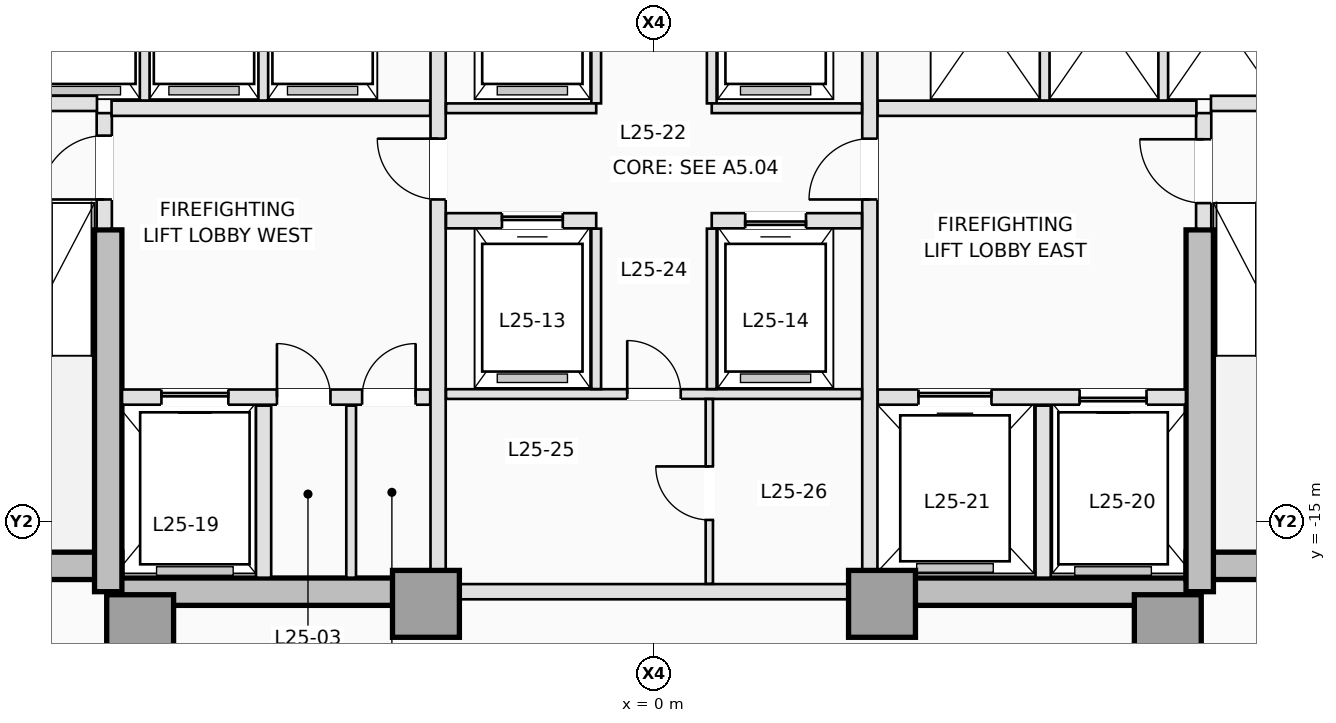
"""IFC4 building model, lengths in metres.
Left out: names, types, materials, properties, quantities, classifications, styles, units other than length and angle.
Written with IfcOpenShell. Run it as: python <this file> out.ifc"""

import sys

from ifc_helpers import new_model, si_unit, direction, frame, frame_2d, origin, origin_2d, place, context, subcontext, project, spatial, rectangle, extrude, element, fill, save


model = new_model("IFC4")
c1 = context("Model", 3, precision=1e-05, world=origin(), true_north=direction((0.0, 1.0)))
c2 = subcontext(c1, "Body", "Model", "MODEL_VIEW")
j1 = project(units=[si_unit("LENGTHUNIT", "METRE"), si_unit("PLANEANGLEUNIT", "RADIAN")], contexts=[c1])
p1 = place(None, origin())
s1 = spatial("IfcSite", under=j1, at=p1, CompositionType="ELEMENT")
p2 = place(p1, origin())
s2 = spatial("IfcBuilding", under=s1, at=p2, CompositionType="ELEMENT")
p3 = place(p2, frame((0.0, 0.0, 95.0)))
s3 = spatial("IfcBuildingStorey", under=s2, at=p3, CompositionType="ELEMENT", Elevation=95.0)
p4 = place(p3, frame((-12.65, -15.725, 0.0), z_axis=(0.0, 0.0, 1.0), x_axis=(1.0, 0.0, 0.0)))
e1 = element("IfcWall", 1, at=p4, inside=s3, PredefinedType="SHEAR", context=c2, shape_type="SweptSolid", body=[
    extrude(rectangle(XDim=3.9, YDim=0.45, at=frame_2d((1.95, 0.0))), origin(), (0.0, 0.0, 1.0), 3.5),
])
for number, where, z_axis, x_axis in (
    (2, (-8.975, -16.15, 0.0), (0.0, 0.0, 1.0), (1.0, 0.0, 0.0)),
    (3, (3.75, -16.15, 0.0), (0.0, 0.0, 1.0), (1.0, 0.0, 0.0)),
):
    element("IfcWall", number, at=place(p3, frame(where, z_axis=z_axis, x_axis=x_axis)), inside=s3, PredefinedType="SHEAR", context=c2, shape_type="SweptSolid", body=[
        extrude(rectangle(XDim=5.225, YDim=0.45, at=frame_2d((2.613, 0.0))), origin(), (0.0, 0.0, 1.0), 3.5),
    ])
p5 = place(p3, frame((8.75, -15.725, 0.0), z_axis=(0.0, 0.0, 1.0), x_axis=(1.0, 0.0, 0.0)))
e4 = element("IfcWall", 4, at=p5, inside=s3, PredefinedType="SHEAR", context=c2, shape_type="SweptSolid", body=[
    extrude(rectangle(XDim=3.9, YDim=0.45, at=frame_2d((1.95, 0.0))), origin(), (0.0, 0.0, 1.0), 3.5),
])
for number, where, z_axis, x_axis in (
    (5, (-8.975, -16.15, 0.0), (0.0, 0.0, 1.0), (0.0, 1.0, 0.0)),
    (6, (8.975, -16.15, 0.0), (0.0, 0.0, 1.0), (0.0, 1.0, 0.0)),
):
    element("IfcWall", number, at=place(p3, frame(where, z_axis=z_axis, x_axis=x_axis)), inside=s3, PredefinedType="SHEAR", context=c2, shape_type="SweptSolid", body=[
        extrude(rectangle(XDim=5.95, YDim=0.45, at=frame_2d((2.975, 0.0))), origin(), (0.0, 0.0, 1.0), 3.5),
    ])
for number, where, z_axis, x_axis in (
    (7, (-8.45, -16.75, 0.0), (0.0, 0.0, 1.0), (1.0, 0.0, 0.0)),
    (8, (-3.75, -16.35, 0.0), (0.0, 0.0, 1.0), (1.0, 0.0, 0.0)),
    (9, (3.75, -16.35, 0.0), (0.0, 0.0, 1.0), (1.0, 0.0, 0.0)),
    (10, (8.45, -16.75, 0.0), (0.0, 0.0, 1.0), (1.0, 0.0, 0.0)),
):
    element("IfcColumn", number, at=place(p3, frame(where, z_axis=z_axis, x_axis=x_axis)), inside=s3, PredefinedType="COLUMN", context=c2, shape_type="SweptSolid", body=[
        extrude(rectangle(XDim=1.1, YDim=1.1, at=origin_2d()), origin(), (0.0, 0.0, 1.0), 3.5),
    ])
p6 = place(p3, frame((-9.04, -10.18, 0.0), z_axis=(0.0, 0.0, 1.0), x_axis=(0.0, 1.0, 0.0)))
e11 = element("IfcWall", 11, at=p6, inside=s3, PredefinedType="PARTITIONING", context=c2, shape_type="SweptSolid", body=[
    extrude(rectangle(XDim=1.9, YDim=0.25, at=frame_2d((0.95, 0.0))), origin(), (0.0, 0.0, 1.0), 3.25),
])
p7 = place(p6, frame((0.48, 0.0, 0.0)))
e12 = element("IfcOpeningElement", 12, at=p7, cuts=e11, PredefinedType="OPENING", context=c2, shape_type="SweptSolid", body=[
    extrude(rectangle(XDim=1.05, YDim=2.15, at=frame_2d((0.525, 1.075))), frame((0.0, 0.135, 0.0), z_axis=(0.0, -1.0, 0.0), x_axis=(1.0, 0.0, 0.0)), (0.0, 0.0, 1.0), 0.27),
])
p8 = place(p3, frame((9.04, -10.18, 0.0), z_axis=(0.0, 0.0, 1.0), x_axis=(0.0, 1.0, 0.0)))
e13 = element("IfcWall", 13, at=p8, inside=s3, PredefinedType="PARTITIONING", context=c2, shape_type="SweptSolid", body=[
    extrude(rectangle(XDim=1.9, YDim=0.25, at=frame_2d((0.95, 0.0))), origin(), (0.0, 0.0, 1.0), 3.25),
])
p9 = place(p8, frame((0.42, 0.0, 0.0)))
e14 = element("IfcOpeningElement", 14, at=p9, cuts=e13, PredefinedType="OPENING", context=c2, shape_type="SweptSolid", body=[
    extrude(rectangle(XDim=1.05, YDim=2.15, at=frame_2d((0.525, 1.075))), frame((0.0, 0.135, 0.0), z_axis=(0.0, -1.0, 0.0), x_axis=(1.0, 0.0, 0.0)), (0.0, 0.0, 1.0), 0.27),
])
for number, where, z_axis, x_axis in (
    (15, (-12.38, -8.12, 0.0), (0.0, 0.0, 1.0), (1.0, 0.0, 0.0)),
    (16, (9.16, -8.12, 0.0), (0.0, 0.0, 1.0), (1.0, 0.0, 0.0)),
):
    element("IfcWall", number, at=place(p3, frame(where, z_axis=z_axis, x_axis=x_axis)), inside=s3, PredefinedType="PARTITIONING", context=c2, shape_type="SweptSolid", body=[
        extrude(rectangle(XDim=3.22, YDim=0.25, at=frame_2d((1.61, 0.0))), origin(), (0.0, 0.0, 1.0), 3.25),
    ])
p10 = place(p3, frame((-8.748, -12.95, 0.0), z_axis=(0.0, 0.0, 1.0), x_axis=(1.0, 0.0, 0.0)))
e17 = element("IfcWall", 17, at=p10, inside=s3, PredefinedType="PARTITIONING", context=c2, shape_type="SweptSolid", body=[
    extrude(rectangle(XDim=5.068, YDim=0.25, at=frame_2d((2.534, 0.0))), origin(), (0.0, 0.0, 1.0), 3.25),
])
p11 = place(p10, frame((0.648, 0.0, 0.0)))
e18 = element("IfcOpeningElement", 18, at=p11, cuts=e17, PredefinedType="OPENING", context=c2, shape_type="SweptSolid", body=[
    extrude(rectangle(XDim=1.1, YDim=2.15, at=frame_2d((0.55, 1.075))), frame((0.0, 0.135, 0.0), z_axis=(0.0, -1.0, 0.0), x_axis=(1.0, 0.0, 0.0)), (0.0, 0.0, 1.0), 0.27),
])
p12 = place(p10, frame((2.548, 0.0, 0.0)))
e19 = element("IfcOpeningElement", 19, at=p12, cuts=e17, PredefinedType="OPENING", context=c2, shape_type="SweptSolid", body=[
    extrude(rectangle(XDim=0.88, YDim=2.1, at=frame_2d((0.44, 1.05))), frame((0.0, 0.135, 0.0), z_axis=(0.0, -1.0, 0.0), x_axis=(1.0, 0.0, 0.0)), (0.0, 0.0, 1.0), 0.27),
])
p13 = place(p10, frame((3.948, 0.0, 0.0)))
e20 = element("IfcOpeningElement", 20, at=p13, cuts=e17, PredefinedType="OPENING", context=c2, shape_type="SweptSolid", body=[
    extrude(rectangle(XDim=0.88, YDim=2.1, at=frame_2d((0.44, 1.05))), frame((0.0, 0.135, 0.0), z_axis=(0.0, -1.0, 0.0), x_axis=(1.0, 0.0, 0.0)), (0.0, 0.0, 1.0), 0.27),
])
p14 = place(p3, frame((3.68, -12.95, 0.0), z_axis=(0.0, 0.0, 1.0), x_axis=(1.0, 0.0, 0.0)))
e21 = element("IfcWall", 21, at=p14, inside=s3, PredefinedType="PARTITIONING", context=c2, shape_type="SweptSolid", body=[
    extrude(rectangle(XDim=5.068, YDim=0.25, at=frame_2d((2.534, 0.0))), origin(), (0.0, 0.0, 1.0), 3.25),
])
p15 = place(p14, frame((3.32, 0.0, 0.0)))
e22 = element("IfcOpeningElement", 22, at=p15, cuts=e21, PredefinedType="OPENING", context=c2, shape_type="SweptSolid", body=[
    extrude(rectangle(XDim=1.1, YDim=2.15, at=frame_2d((0.55, 1.075))), frame((0.0, 0.135, 0.0), z_axis=(0.0, -1.0, 0.0), x_axis=(1.0, 0.0, 0.0)), (0.0, 0.0, 1.0), 0.27),
])
p16 = place(p14, frame((0.67, 0.0, 0.0)))
e23 = element("IfcOpeningElement", 23, at=p16, cuts=e21, PredefinedType="OPENING", context=c2, shape_type="SweptSolid", body=[
    extrude(rectangle(XDim=1.2, YDim=2.15, at=frame_2d((0.6, 1.075))), frame((0.0, 0.135, 0.0), z_axis=(0.0, -1.0, 0.0), x_axis=(1.0, 0.0, 0.0)), (0.0, 0.0, 1.0), 0.27),
])
p17 = place(p3, frame((-6.42, -15.92, 0.0), z_axis=(0.0, 0.0, 1.0), x_axis=(0.0, 1.0, 0.0)))
e24 = element("IfcWall", 24, at=p17, inside=s3, PredefinedType="PARTITIONING", context=c2, shape_type="SweptSolid", body=[
    extrude(rectangle(XDim=2.83, YDim=0.25, at=frame_2d((1.415, 0.0))), origin(), (0.0, 0.0, 1.0), 3.25),
])
p18 = place(p3, frame((-4.98, -15.92, 0.0), z_axis=(0.0, 0.0, 1.0), x_axis=(0.0, 1.0, 0.0)))
e25 = element("IfcWall", 25, at=p18, inside=s3, PredefinedType="PARTITIONING", context=c2, shape_type="SweptSolid", body=[
    extrude(rectangle(XDim=2.83, YDim=0.16, at=frame_2d((1.415, 0.0))), origin(), (0.0, 0.0, 1.0), 3.25),
])
p19 = place(p3, frame((6.4, -15.92, 0.0), z_axis=(0.0, 0.0, 1.0), x_axis=(0.0, 1.0, 0.0)))
e26 = element("IfcWall", 26, at=p19, inside=s3, PredefinedType="PARTITIONING", context=c2, shape_type="SweptSolid", body=[
    extrude(rectangle(XDim=2.83, YDim=0.25, at=frame_2d((1.415, 0.0))), origin(), (0.0, 0.0, 1.0), 3.25),
])
for number, where, z_axis, x_axis in (
    (27, (-8.92, -8.2, 0.0), (0.0, 0.0, 1.0), (1.0, 0.0, 0.0)),
    (28, (3.68, -8.2, 0.0), (0.0, 0.0, 1.0), (1.0, 0.0, 0.0)),
):
    element("IfcWall", number, at=place(p3, frame(where, z_axis=z_axis, x_axis=x_axis)), inside=s3, PredefinedType="PARTITIONING", context=c2, shape_type="SweptSolid", body=[
        extrude(rectangle(XDim=5.24, YDim=0.25, at=frame_2d((2.62, 0.0))), origin(), (0.0, 0.0, 1.0), 3.25),
    ])
p20 = place(p3, frame((-3.55, -15.798, 0.0), z_axis=(0.0, 0.0, 1.0), x_axis=(0.0, 1.0, 0.0)))
e29 = element("IfcWall", 29, at=p20, inside=s3, PredefinedType="PARTITIONING", context=c2, shape_type="SweptSolid", body=[
    extrude(rectangle(XDim=10.446, YDim=0.25, at=frame_2d((5.223, 0.0))), origin(), (0.0, 0.0, 1.0), 3.25),
])
p21 = place(p20, frame((6.098, 0.0, 0.0)))
e30 = element("IfcOpeningElement", 30, at=p21, cuts=e29, PredefinedType="OPENING", context=c2, shape_type="SweptSolid", body=[
    extrude(rectangle(XDim=1.0, YDim=2.15, at=frame_2d((0.5, 1.075))), frame((0.0, 0.135, 0.0), z_axis=(0.0, -1.0, 0.0), x_axis=(1.0, 0.0, 0.0)), (0.0, 0.0, 1.0), 0.27),
])
p22 = place(p3, frame((3.55, -15.798, 0.0), z_axis=(0.0, 0.0, 1.0), x_axis=(0.0, 1.0, 0.0)))
e31 = element("IfcWall", 31, at=p22, inside=s3, PredefinedType="PARTITIONING", context=c2, shape_type="SweptSolid", body=[
    extrude(rectangle(XDim=10.446, YDim=0.25, at=frame_2d((5.223, 0.0))), origin(), (0.0, 0.0, 1.0), 3.25),
])
p23 = place(p22, frame((6.098, 0.0, 0.0)))
e32 = element("IfcOpeningElement", 32, at=p23, cuts=e31, PredefinedType="OPENING", context=c2, shape_type="SweptSolid", body=[
    extrude(rectangle(XDim=1.0, YDim=2.15, at=frame_2d((0.5, 1.075))), frame((0.0, 0.135, 0.0), z_axis=(0.0, -1.0, 0.0), x_axis=(1.0, 0.0, 0.0)), (0.0, 0.0, 1.0), 0.27),
])
for number, where, z_axis, x_axis in (
    (33, (-8.375, -8.073, 0.0), (0.0, 0.0, 1.0), (0.0, 1.0, 0.0)),
    (34, (-6.425, -8.073, 0.0), (0.0, 0.0, 1.0), (0.0, 1.0, 0.0)),
    (35, (6.425, -8.073, 0.0), (0.0, 0.0, 1.0), (0.0, 1.0, 0.0)),
    (36, (8.375, -8.073, 0.0), (0.0, 0.0, 1.0), (0.0, 1.0, 0.0)),
):
    element("IfcWall", number, at=place(p3, frame(where, z_axis=z_axis, x_axis=x_axis)), inside=s3, PredefinedType="PARTITIONING", context=c2, shape_type="SweptSolid", body=[
        extrude(rectangle(XDim=2.733, YDim=0.16, at=frame_2d((1.366, 0.0))), origin(), (0.0, 0.0, 1.0), 3.25),
    ])
p24 = place(p3, frame((-3.198, -16.15, 0.0), z_axis=(0.0, 0.0, 1.0), x_axis=(1.0, 0.0, 0.0)))
e37 = element("IfcWall", 37, at=p24, inside=s3, PredefinedType="PARTITIONING", context=c2, shape_type="SweptSolid", body=[
    extrude(rectangle(XDim=6.396, YDim=0.25, at=frame_2d((3.198, 0.0))), origin(), (0.0, 0.0, 1.0), 2.3),
])
for number, where, z_axis, x_axis in (
    (38, (-0.95, -8.12, 0.0), (0.0, 0.0, 1.0), (0.0, 1.0, 0.0)),
    (39, (0.95, -8.12, 0.0), (0.0, 0.0, 1.0), (0.0, 1.0, 0.0)),
):
    element("IfcWall", number, at=place(p3, frame(where, z_axis=z_axis, x_axis=x_axis)), inside=s3, PredefinedType="PARTITIONING", context=c2, shape_type="SweptSolid", body=[
        extrude(rectangle(XDim=2.78, YDim=0.16, at=frame_2d((1.39, 0.0))), origin(), (0.0, 0.0, 1.0), 3.25),
    ])
for number, where, z_axis, x_axis in (
    (40, (-3.42, -8.2, 0.0), (0.0, 0.0, 1.0), (1.0, 0.0, 0.0)),
    (41, (0.95, -8.2, 0.0), (0.0, 0.0, 1.0), (1.0, 0.0, 0.0)),
):
    element("IfcWall", number, at=place(p3, frame(where, z_axis=z_axis, x_axis=x_axis)), inside=s3, PredefinedType="PARTITIONING", context=c2, shape_type="SweptSolid", body=[
        extrude(rectangle(XDim=2.47, YDim=0.16, at=frame_2d((1.235, 0.0))), origin(), (0.0, 0.0, 1.0), 3.25),
    ])
p25 = place(p3, frame((-3.42, -10.05, 0.0), z_axis=(0.0, 0.0, 1.0), x_axis=(1.0, 0.0, 0.0)))
e42 = element("IfcWall", 42, at=p25, inside=s3, PredefinedType="PARTITIONING", context=c2, shape_type="SweptSolid", body=[
    extrude(rectangle(XDim=2.47, YDim=0.25, at=frame_2d((1.235, 0.0))), origin(), (0.0, 0.0, 1.0), 3.25),
])
p26 = place(p25, frame((0.92, 0.0, 0.0)))
e43 = element("IfcOpeningElement", 43, at=p26, cuts=e42, PredefinedType="OPENING", context=c2, shape_type="SweptSolid", body=[
    extrude(rectangle(XDim=1.0, YDim=2.15, at=frame_2d((0.5, 1.075))), frame((0.0, 0.135, 0.0), z_axis=(0.0, -1.0, 0.0), x_axis=(1.0, 0.0, 0.0)), (0.0, 0.0, 1.0), 0.27),
])
p27 = place(p3, frame((0.95, -10.05, 0.0), z_axis=(0.0, 0.0, 1.0), x_axis=(1.0, 0.0, 0.0)))
e44 = element("IfcWall", 44, at=p27, inside=s3, PredefinedType="PARTITIONING", context=c2, shape_type="SweptSolid", body=[
    extrude(rectangle(XDim=2.47, YDim=0.25, at=frame_2d((1.235, 0.0))), origin(), (0.0, 0.0, 1.0), 3.25),
])
p28 = place(p27, frame((0.55, 0.0, 0.0)))
e45 = element("IfcOpeningElement", 45, at=p28, cuts=e44, PredefinedType="OPENING", context=c2, shape_type="SweptSolid", body=[
    extrude(rectangle(XDim=1.0, YDim=2.15, at=frame_2d((0.5, 1.075))), frame((0.0, 0.135, 0.0), z_axis=(0.0, -1.0, 0.0), x_axis=(1.0, 0.0, 0.0)), (0.0, 0.0, 1.0), 0.27),
])
p29 = place(p3, frame((-3.42, -12.9, 0.0), z_axis=(0.0, 0.0, 1.0), x_axis=(1.0, 0.0, 0.0)))
e46 = element("IfcWall", 46, at=p29, inside=s3, PredefinedType="PARTITIONING", context=c2, shape_type="SweptSolid", body=[
    extrude(rectangle(XDim=6.84, YDim=0.16, at=frame_2d((3.42, 0.0))), origin(), (0.0, 0.0, 1.0), 3.25),
])
p30 = place(p29, frame((2.98, 0.0, 0.0)))
e47 = element("IfcOpeningElement", 47, at=p30, cuts=e46, PredefinedType="OPENING", context=c2, shape_type="SweptSolid", body=[
    extrude(rectangle(XDim=0.88, YDim=2.12, at=frame_2d((0.44, 1.06))), frame((0.0, 0.09, 0.0), z_axis=(0.0, -1.0, 0.0), x_axis=(1.0, 0.0, 0.0)), (0.0, 0.0, 1.0), 0.18),
])
for number, where, z_axis, x_axis in (
    (48, (-0.95, -12.818, 0.0), (0.0, 0.0, 1.0), (0.0, 1.0, 0.0)),
    (49, (0.95, -12.818, 0.0), (0.0, 0.0, 1.0), (0.0, 1.0, 0.0)),
):
    element("IfcWall", number, at=place(p3, frame(where, z_axis=z_axis, x_axis=x_axis)), inside=s3, PredefinedType="PARTITIONING", context=c2, shape_type="SweptSolid", body=[
        extrude(rectangle(XDim=2.638, YDim=0.16, at=frame_2d((1.319, 0.0))), origin(), (0.0, 0.0, 1.0), 3.25),
    ])
p31 = place(p3, frame((0.91, -16.02, 0.0), z_axis=(0.0, 0.0, 1.0), x_axis=(0.0, 1.0, 0.0)))
e50 = element("IfcWall", 50, at=p31, inside=s3, PredefinedType="PARTITIONING", context=c2, shape_type="SweptSolid", body=[
    extrude(rectangle(XDim=3.038, YDim=0.12, at=frame_2d((1.519, 0.0))), origin(), (0.0, 0.0, 1.0), 3.25),
])
p32 = place(p31, frame((1.05, 0.0, 0.0)))
e51 = element("IfcOpeningElement", 51, at=p32, cuts=e50, PredefinedType="OPENING", context=c2, shape_type="SweptSolid", body=[
    extrude(rectangle(XDim=0.88, YDim=2.12, at=frame_2d((0.44, 1.06))), frame((0.0, 0.07, 0.0), z_axis=(0.0, -1.0, 0.0), x_axis=(1.0, 0.0, 0.0)), (0.0, 0.0, 1.0), 0.14),
])
p33 = place(p11, origin())
e52 = element("IfcDoor", 52, at=p33, inside=s3, OperationType="SLIDING_TO_LEFT", PredefinedType="DOOR", context=c2, shape_type="SweptSolid", body=[
    extrude(rectangle(XDim=1.1, YDim=2.15, at=frame_2d((0.55, 1.075))), frame((0.0, 0.025, 0.0), z_axis=(0.0, -1.0, 0.0), x_axis=(1.0, 0.0, 0.0)), (0.0, 0.0, 1.0), 0.05),
])
fill(e18, e52)
p34 = place(p15, origin())
e53 = element("IfcDoor", 53, at=p34, inside=s3, OperationType="SLIDING_TO_RIGHT", PredefinedType="DOOR", context=c2, shape_type="SweptSolid", body=[
    extrude(rectangle(XDim=1.1, YDim=2.15, at=frame_2d((0.55, 1.075))), frame((0.0, 0.025, 0.0), z_axis=(0.0, -1.0, 0.0), x_axis=(1.0, 0.0, 0.0)), (0.0, 0.0, 1.0), 0.05),
])
fill(e22, e53)
p35 = place(p16, origin())
e54 = element("IfcDoor", 54, at=p35, inside=s3, OperationType="SLIDING_TO_LEFT", PredefinedType="DOOR", context=c2, shape_type="SweptSolid", body=[
    extrude(rectangle(XDim=1.2, YDim=2.15, at=frame_2d((0.6, 1.075))), frame((0.0, 0.025, 0.0), z_axis=(0.0, -1.0, 0.0), x_axis=(1.0, 0.0, 0.0)), (0.0, 0.0, 1.0), 0.05),
])
fill(e23, e54)
p36 = place(p26, origin())
e55 = element("IfcDoor", 55, at=p36, inside=s3, OperationType="SLIDING_TO_LEFT", PredefinedType="DOOR", context=c2, shape_type="SweptSolid", body=[
    extrude(rectangle(XDim=1.0, YDim=2.15, at=frame_2d((0.5, 1.075))), frame((0.0, 0.025, 0.0), z_axis=(0.0, -1.0, 0.0), x_axis=(1.0, 0.0, 0.0)), (0.0, 0.0, 1.0), 0.05),
])
fill(e43, e55)
p37 = place(p28, origin())
e56 = element("IfcDoor", 56, at=p37, inside=s3, OperationType="SLIDING_TO_RIGHT", PredefinedType="DOOR", context=c2, shape_type="SweptSolid", body=[
    extrude(rectangle(XDim=1.0, YDim=2.15, at=frame_2d((0.5, 1.075))), frame((0.0, 0.025, 0.0), z_axis=(0.0, -1.0, 0.0), x_axis=(1.0, 0.0, 0.0)), (0.0, 0.0, 1.0), 0.05),
])
fill(e45, e56)
p38 = place(p7, origin())
e57 = element("IfcDoor", 57, at=p38, inside=s3, OperationType="SINGLE_SWING_LEFT", PredefinedType="DOOR", context=c2, shape_type="SweptSolid", body=[
    extrude(rectangle(XDim=1.05, YDim=2.15, at=frame_2d((0.525, 1.075))), frame((0.0, 0.025, 0.0), z_axis=(0.0, -1.0, 0.0), x_axis=(1.0, 0.0, 0.0)), (0.0, 0.0, 1.0), 0.05),
])
fill(e12, e57)
p39 = place(p9, origin())
e58 = element("IfcDoor", 58, at=p39, inside=s3, OperationType="SINGLE_SWING_RIGHT", PredefinedType="DOOR", context=c2, shape_type="SweptSolid", body=[
    extrude(rectangle(XDim=1.05, YDim=2.15, at=frame_2d((0.525, 1.075))), frame((0.0, 0.025, 0.0), z_axis=(0.0, -1.0, 0.0), x_axis=(1.0, 0.0, 0.0)), (0.0, 0.0, 1.0), 0.05),
])
fill(e14, e58)
p40 = place(p12, origin())
e59 = element("IfcDoor", 59, at=p40, inside=s3, OperationType="SINGLE_SWING_LEFT", PredefinedType="TRAPDOOR", context=c2, shape_type="SweptSolid", body=[
    extrude(rectangle(XDim=0.88, YDim=2.1, at=frame_2d((0.44, 1.05))), frame((0.0, 0.025, 0.0), z_axis=(0.0, -1.0, 0.0), x_axis=(1.0, 0.0, 0.0)), (0.0, 0.0, 1.0), 0.05),
])
fill(e19, e59)
p41 = place(p13, origin())
e60 = element("IfcDoor", 60, at=p41, inside=s3, OperationType="SINGLE_SWING_RIGHT", PredefinedType="TRAPDOOR", context=c2, shape_type="SweptSolid", body=[
    extrude(rectangle(XDim=0.88, YDim=2.1, at=frame_2d((0.44, 1.05))), frame((0.0, 0.025, 0.0), z_axis=(0.0, -1.0, 0.0), x_axis=(1.0, 0.0, 0.0)), (0.0, 0.0, 1.0), 0.05),
])
fill(e20, e60)
p42 = place(p21, origin())
e61 = element("IfcDoor", 61, at=p42, inside=s3, OperationType="SINGLE_SWING_RIGHT", PredefinedType="DOOR", context=c2, shape_type="SweptSolid", body=[
    extrude(rectangle(XDim=1.0, YDim=2.15, at=frame_2d((0.5, 1.075))), frame((0.0, 0.025, 0.0), z_axis=(0.0, -1.0, 0.0), x_axis=(1.0, 0.0, 0.0)), (0.0, 0.0, 1.0), 0.05),
])
fill(e30, e61)
p43 = place(p23, origin())
e62 = element("IfcDoor", 62, at=p43, inside=s3, OperationType="SINGLE_SWING_LEFT", PredefinedType="DOOR", context=c2, shape_type="SweptSolid", body=[
    extrude(rectangle(XDim=1.0, YDim=2.15, at=frame_2d((0.5, 1.075))), frame((0.0, 0.025, 0.0), z_axis=(0.0, -1.0, 0.0), x_axis=(1.0, 0.0, 0.0)), (0.0, 0.0, 1.0), 0.05),
])
fill(e32, e62)
p44 = place(p30, origin())
e63 = element("IfcDoor", 63, at=p44, inside=s3, OperationType="SINGLE_SWING_LEFT", PredefinedType="DOOR", context=c2, shape_type="SweptSolid", body=[
    extrude(rectangle(XDim=0.88, YDim=2.12, at=frame_2d((0.44, 1.06))), frame((0.0, 0.025, 0.0), z_axis=(0.0, -1.0, 0.0), x_axis=(1.0, 0.0, 0.0)), (0.0, 0.0, 1.0), 0.05),
])
fill(e47, e63)
p45 = place(p32, origin())
e64 = element("IfcDoor", 64, at=p45, inside=s3, OperationType="SINGLE_SWING_RIGHT", PredefinedType="DOOR", context=c2, shape_type="SweptSolid", body=[
    extrude(rectangle(XDim=0.88, YDim=2.12, at=frame_2d((0.44, 1.06))), frame((0.0, 0.025, 0.0), z_axis=(0.0, -1.0, 0.0), x_axis=(1.0, 0.0, 0.0)), (0.0, 0.0, 1.0), 0.05),
])
fill(e51, e64)
save(model, sys.argv[1])
